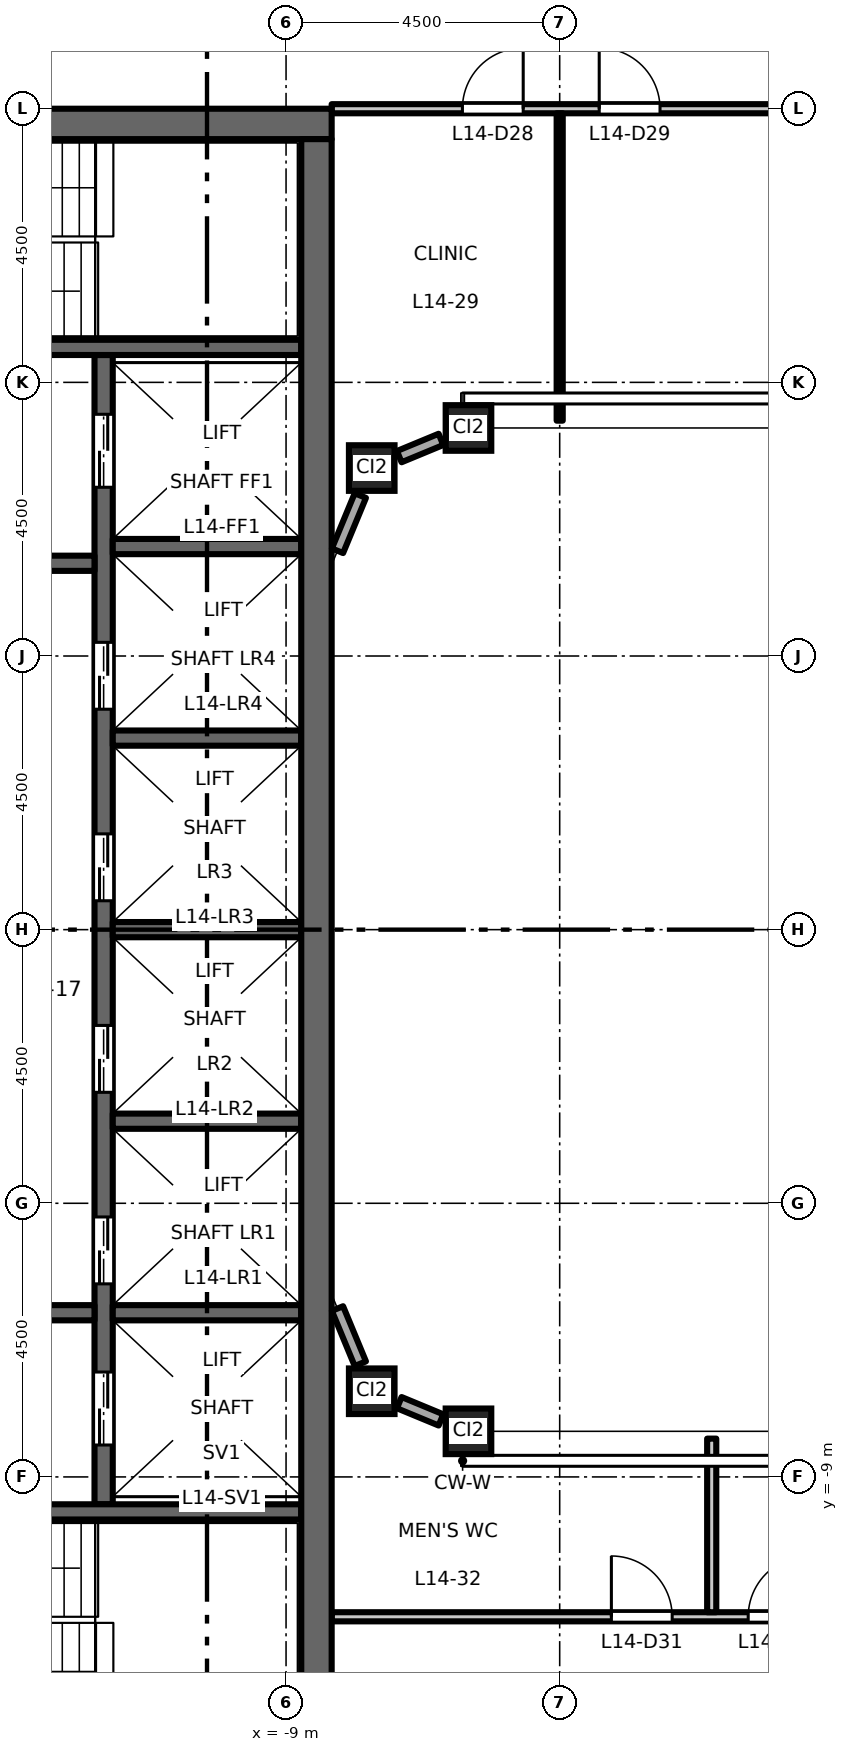
"""IFC4 building model, lengths in metres.
Left out: names, types, materials, properties, quantities, classifications, styles, units other than length and angle.
Written with IfcOpenShell. Run it as: python <this file> out.ifc"""

import sys

from ifc_helpers import new_model, si_unit, direction, frame, frame_2d, origin, origin_2d, place, context, subcontext, project, spatial, rectangle, hollow_rectangle, extrude, element, fill, save


model = new_model("IFC4")
c1 = context("Model", 3, precision=1e-05, world=origin(), true_north=direction((0.0, 1.0)))
c2 = subcontext(c1, "Body", "Model", "MODEL_VIEW")
j1 = project(units=[si_unit("LENGTHUNIT", "METRE"), si_unit("PLANEANGLEUNIT", "RADIAN")], contexts=[c1])
p1 = place(None, origin())
s1 = spatial("IfcSite", under=j1, at=p1, CompositionType="ELEMENT")
p2 = place(p1, origin())
s2 = spatial("IfcBuilding", under=s1, at=p2, CompositionType="ELEMENT")
p3 = place(p2, frame((0.0, 0.0, 67.2)))
s3 = spatial("IfcBuildingStorey", under=s2, at=p3, CompositionType="ELEMENT", Elevation=67.2)
for number, where, z_axis, x_axis in (
    (1, (-7.591, -7.591, 0.0), (0.0, 0.0, 1.0), (1.0, 0.0, 0.0)),
    (2, (-6.0, -8.25, 0.0), (0.0, 0.0, 1.0), (1.0, 0.0, 0.0)),
    (3, (-7.591, 7.591, 0.0), (0.0, 0.0, 1.0), (1.0, 0.0, 0.0)),
    (4, (-6.0, 8.25, 0.0), (0.0, 0.0, 1.0), (1.0, 0.0, 0.0)),
):
    element("IfcColumn", number, at=place(p3, frame(where, z_axis=z_axis, x_axis=x_axis)), inside=s3, PredefinedType="COLUMN", context=c2, shape_type="SweptSolid", body=[
        extrude(hollow_rectangle(XDim=0.75, YDim=0.75, WallThickness=0.045, at=origin_2d()), origin(), (0.0, 0.0, 1.0), 4.5),
    ])
p4 = place(p3, frame((-12.0, -9.45, 0.0), z_axis=(0.0, 0.0, 1.0), x_axis=(0.0, 1.0, 0.0)))
e5 = element("IfcWall", 5, at=p4, inside=s3, PredefinedType="SHEAR", context=c2, shape_type="SweptSolid", body=[
    extrude(rectangle(XDim=18.9, YDim=0.3, at=frame_2d((9.45, 0.0))), origin(), (0.0, 0.0, 1.0), 4.35),
])
p5 = place(p4, frame((3.625, 0.0, 0.0)))
e6 = element("IfcOpeningElement", 6, at=p5, cuts=e5, PredefinedType="OPENING", context=c2, shape_type="SweptSolid", body=[
    extrude(rectangle(XDim=1.1, YDim=2.1, at=frame_2d((0.55, 1.05))), frame((0.0, 0.16, 0.0), z_axis=(0.0, -1.0, 0.0), x_axis=(1.0, 0.0, 0.0)), (0.0, 0.0, 1.0), 0.32),
])
p6 = place(p4, frame((6.775, 0.0, 0.0)))
e7 = element("IfcOpeningElement", 7, at=p6, cuts=e5, PredefinedType="OPENING", context=c2, shape_type="SweptSolid", body=[
    extrude(rectangle(XDim=1.1, YDim=2.1, at=frame_2d((0.55, 1.05))), frame((0.0, 0.16, 0.0), z_axis=(0.0, -1.0, 0.0), x_axis=(1.0, 0.0, 0.0)), (0.0, 0.0, 1.0), 0.32),
])
p7 = place(p4, frame((9.925, 0.0, 0.0)))
e8 = element("IfcOpeningElement", 8, at=p7, cuts=e5, PredefinedType="OPENING", context=c2, shape_type="SweptSolid", body=[
    extrude(rectangle(XDim=1.1, YDim=2.1, at=frame_2d((0.55, 1.05))), frame((0.0, 0.16, 0.0), z_axis=(0.0, -1.0, 0.0), x_axis=(1.0, 0.0, 0.0)), (0.0, 0.0, 1.0), 0.32),
])
p8 = place(p4, frame((13.075, 0.0, 0.0)))
e9 = element("IfcOpeningElement", 9, at=p8, cuts=e5, PredefinedType="OPENING", context=c2, shape_type="SweptSolid", body=[
    extrude(rectangle(XDim=1.1, YDim=2.1, at=frame_2d((0.55, 1.05))), frame((0.0, 0.16, 0.0), z_axis=(0.0, -1.0, 0.0), x_axis=(1.0, 0.0, 0.0)), (0.0, 0.0, 1.0), 0.32),
])
p9 = place(p4, frame((16.725, 0.0, 0.0)))
e10 = element("IfcOpeningElement", 10, at=p9, cuts=e5, PredefinedType="OPENING", context=c2, shape_type="SweptSolid", body=[
    extrude(rectangle(XDim=1.2, YDim=2.1, at=frame_2d((0.6, 1.05))), frame((0.0, 0.16, 0.0), z_axis=(0.0, -1.0, 0.0), x_axis=(1.0, 0.0, 0.0)), (0.0, 0.0, 1.0), 0.32),
])
p10 = place(p4, frame((0.975, 0.0, 0.0)))
e11 = element("IfcOpeningElement", 11, at=p10, cuts=e5, PredefinedType="OPENING", context=c2, shape_type="SweptSolid", body=[
    extrude(rectangle(XDim=1.2, YDim=2.1, at=frame_2d((0.6, 1.05))), frame((0.0, 0.16, 0.0), z_axis=(0.0, -1.0, 0.0), x_axis=(1.0, 0.0, 0.0)), (0.0, 0.0, 1.0), 0.32),
])
p11 = place(p3, frame((-12.15, 6.025, 0.0), z_axis=(0.0, 0.0, 1.0), x_axis=(-1.0, 0.0, 0.0)))
e12 = element("IfcWall", 12, at=p11, inside=s3, PredefinedType="SHEAR", context=c2, shape_type="SweptSolid", body=[
    extrude(rectangle(XDim=4.6, YDim=0.25, at=frame_2d((2.3, 0.0))), origin(), (0.0, 0.0, 1.0), 4.35),
])
p12 = place(p11, frame((1.8, 0.0, 0.0)))
e13 = element("IfcOpeningElement", 13, at=p12, cuts=e12, PredefinedType="OPENING", context=c2, shape_type="SweptSolid", body=[
    extrude(rectangle(XDim=1.0, YDim=2.1, at=frame_2d((0.5, 1.05))), frame((0.0, 0.135, 0.0), z_axis=(0.0, -1.0, 0.0), x_axis=(1.0, 0.0, 0.0)), (0.0, 0.0, 1.0), 0.27),
])
p13 = place(p3, frame((-12.15, -6.3, 0.0), z_axis=(0.0, 0.0, 1.0), x_axis=(-1.0, 0.0, 0.0)))
e14 = element("IfcWall", 14, at=p13, inside=s3, PredefinedType="SHEAR", context=c2, shape_type="SweptSolid", body=[
    extrude(rectangle(XDim=9.1, YDim=0.25, at=frame_2d((4.55, 0.0))), origin(), (0.0, 0.0, 1.0), 4.35),
])
p14 = place(p13, frame((1.8, 0.0, 0.0)))
e15 = element("IfcOpeningElement", 15, at=p14, cuts=e14, PredefinedType="OPENING", context=c2, shape_type="SweptSolid", body=[
    extrude(rectangle(XDim=1.0, YDim=2.1, at=frame_2d((0.5, 1.05))), frame((0.0, 0.135, 0.0), z_axis=(0.0, -1.0, 0.0), x_axis=(1.0, 0.0, 0.0)), (0.0, 0.0, 1.0), 0.27),
])
p15 = place(p13, frame((6.65, 0.0, 0.0)))
e16 = element("IfcOpeningElement", 16, at=p15, cuts=e14, PredefinedType="OPENING", context=c2, shape_type="SweptSolid", body=[
    extrude(rectangle(XDim=0.9, YDim=2.1, at=frame_2d((0.45, 1.05))), frame((0.0, 0.135, 0.0), z_axis=(0.0, -1.0, 0.0), x_axis=(1.0, 0.0, 0.0)), (0.0, 0.0, 1.0), 0.27),
])
for number, where, z_axis, x_axis in (
    (17, (-8.75, 0.0, 0.0), (0.0, 0.0, 1.0), (-1.0, 0.0, 0.0)),
    (18, (-8.75, 3.15, 0.0), (0.0, 0.0, 1.0), (-1.0, 0.0, 0.0)),
    (19, (-8.75, 6.3, 0.0), (0.0, 0.0, 1.0), (-1.0, 0.0, 0.0)),
    (20, (-8.75, -3.15, 0.0), (0.0, 0.0, 1.0), (-1.0, 0.0, 0.0)),
    (21, (-8.75, -6.3, 0.0), (0.0, 0.0, 1.0), (-1.0, 0.0, 0.0)),
):
    element("IfcWall", number, at=place(p3, frame(where, z_axis=z_axis, x_axis=x_axis)), inside=s3, PredefinedType="SHEAR", context=c2, shape_type="SweptSolid", body=[
        extrude(rectangle(XDim=3.1, YDim=0.25, at=frame_2d((1.55, 0.0))), origin(), (0.0, 0.0, 1.0), 4.35),
    ])
p16 = place(p3, frame((-8.75, 9.575, 0.0), z_axis=(0.0, 0.0, 1.0), x_axis=(-1.0, 0.0, 0.0)))
e22 = element("IfcWall", 22, at=p16, inside=s3, PredefinedType="SHEAR", context=c2, shape_type="SweptSolid", body=[
    extrude(rectangle(XDim=8.0, YDim=0.25, at=frame_2d((4.0, 0.0))), origin(), (0.0, 0.0, 1.0), 4.35),
])
p17 = place(p16, frame((6.65, 0.0, 0.0)))
e23 = element("IfcOpeningElement", 23, at=p17, cuts=e22, PredefinedType="OPENING", context=c2, shape_type="SweptSolid", body=[
    extrude(rectangle(XDim=1.1, YDim=2.1, at=frame_2d((0.55, 1.05))), frame((0.0, 0.135, 0.0), z_axis=(0.0, -1.0, 0.0), x_axis=(1.0, 0.0, 0.0)), (0.0, 0.0, 1.0), 0.27),
])
p18 = place(p3, frame((-8.75, -9.575, 0.0), z_axis=(0.0, 0.0, 1.0), x_axis=(-1.0, 0.0, 0.0)))
e24 = element("IfcWall", 24, at=p18, inside=s3, PredefinedType="SHEAR", context=c2, shape_type="SweptSolid", body=[
    extrude(rectangle(XDim=8.0, YDim=0.25, at=frame_2d((4.0, 0.0))), origin(), (0.0, 0.0, 1.0), 4.35),
])
p19 = place(p18, frame((6.65, 0.0, 0.0)))
e25 = element("IfcOpeningElement", 25, at=p19, cuts=e24, PredefinedType="OPENING", context=c2, shape_type="SweptSolid", body=[
    extrude(rectangle(XDim=1.1, YDim=2.1, at=frame_2d((0.55, 1.05))), frame((0.0, 0.135, 0.0), z_axis=(0.0, -1.0, 0.0), x_axis=(1.0, 0.0, 0.0)), (0.0, 0.0, 1.0), 0.27),
])
p20 = place(p3, frame((-8.25, 13.25, 0.0), z_axis=(0.0, 0.0, 1.0), x_axis=(-1.0, 0.0, 0.0)))
e26 = element("IfcWall", 26, at=p20, inside=s3, PredefinedType="SHEAR", context=c2, shape_type="SweptSolid", body=[
    extrude(rectangle(XDim=13.5, YDim=0.5, at=frame_2d((6.75, 0.0))), origin(), (0.0, 0.0, 1.0), 4.35),
])
p21 = place(p3, frame((-8.5, -13.0, 0.0), z_axis=(0.0, 0.0, 1.0), x_axis=(0.0, 1.0, 0.0)))
e27 = element("IfcWall", 27, at=p21, inside=s3, PredefinedType="SHEAR", context=c2, shape_type="SweptSolid", body=[
    extrude(rectangle(XDim=26.0, YDim=0.5, at=frame_2d((13.0, 0.0))), origin(), (0.0, 0.0, 1.0), 4.35),
])
p22 = place(p3, frame((-6.453, 8.062, 0.0), z_axis=(0.0, 0.0, 1.0), x_axis=(-0.923940677943, -0.382535780864, 0.0)))
e28 = element("IfcWall", 28, at=p22, inside=s3, PredefinedType="STANDARD", context=c2, shape_type="SweptSolid", body=[
    extrude(rectangle(XDim=0.742, YDim=0.2, at=frame_2d((0.371, 0.0))), origin(), (0.0, 0.0, 1.0), 3.73),
])
for number, where, z_axis, x_axis in (
    (29, (-7.779, 7.138, 0.0), (0.0, 0.0, 1.0), (-0.383, -0.924, 0.0)),
    (30, (-8.154, -6.231, 0.0), (0.0, 0.0, 1.0), (0.383, -0.924, 0.0)),
):
    element("IfcWall", number, at=place(p3, frame(where, z_axis=z_axis, x_axis=x_axis)), inside=s3, PredefinedType="STANDARD", context=c2, shape_type="SweptSolid", body=[
        extrude(rectangle(XDim=0.982, YDim=0.2, at=frame_2d((0.491, 0.0))), origin(), (0.0, 0.0, 1.0), 3.73),
    ])
p23 = place(p3, frame((-7.138, -7.779, 0.0), z_axis=(0.0, 0.0, 1.0), x_axis=(0.923940677943, -0.382535780864, 0.0)))
e31 = element("IfcWall", 31, at=p23, inside=s3, PredefinedType="STANDARD", context=c2, shape_type="SweptSolid", body=[
    extrude(rectangle(XDim=0.742, YDim=0.2, at=frame_2d((0.371, 0.0))), origin(), (0.0, 0.0, 1.0), 3.73),
])
p24 = place(p3, frame((-8.25, -11.3, 0.0), z_axis=(0.0, 0.0, 1.0), x_axis=(1.0, 0.0, 0.0)))
e32 = element("IfcWall", 32, at=p24, inside=s3, PredefinedType="PARTITIONING", context=c2, shape_type="SweptSolid", body=[
    extrude(rectangle(XDim=15.05, YDim=0.15, at=frame_2d((7.525, 0.0))), origin(), (0.0, 0.0, 1.0), 4.35),
])
p25 = place(p24, frame((4.6, 0.0, 0.0)))
e33 = element("IfcOpeningElement", 33, at=p25, cuts=e32, PredefinedType="OPENING", context=c2, shape_type="SweptSolid", body=[
    extrude(rectangle(XDim=1.0, YDim=2.1, at=frame_2d((0.5, 1.05))), frame((0.0, 0.085, 0.0), z_axis=(0.0, -1.0, 0.0), x_axis=(1.0, 0.0, 0.0)), (0.0, 0.0, 1.0), 0.17),
])
p26 = place(p24, frame((6.85, 0.0, 0.0)))
e34 = element("IfcOpeningElement", 34, at=p26, cuts=e32, PredefinedType="OPENING", context=c2, shape_type="SweptSolid", body=[
    extrude(rectangle(XDim=1.0, YDim=2.1, at=frame_2d((0.5, 1.05))), frame((0.0, 0.085, 0.0), z_axis=(0.0, -1.0, 0.0), x_axis=(1.0, 0.0, 0.0)), (0.0, 0.0, 1.0), 0.17),
])
p27 = place(p24, frame((13.4, 0.0, 0.0)))
e35 = element("IfcOpeningElement", 35, at=p27, cuts=e32, PredefinedType="OPENING", context=c2, shape_type="SweptSolid", body=[
    extrude(rectangle(XDim=1.0, YDim=2.1, at=frame_2d((0.5, 1.05))), frame((0.0, 0.085, 0.0), z_axis=(0.0, -1.0, 0.0), x_axis=(1.0, 0.0, 0.0)), (0.0, 0.0, 1.0), 0.17),
])
p28 = place(p3, frame((-8.25, 13.5, 0.0), z_axis=(0.0, 0.0, 1.0), x_axis=(1.0, 0.0, 0.0)))
e36 = element("IfcWall", 36, at=p28, inside=s3, PredefinedType="PARTITIONING", context=c2, shape_type="SweptSolid", body=[
    extrude(rectangle(XDim=16.5, YDim=0.15, at=frame_2d((8.25, 0.0))), origin(), (0.0, 0.0, 1.0), 3.85),
])
p29 = place(p28, frame((2.15, 0.0, 0.0)))
e37 = element("IfcOpeningElement", 37, at=p29, cuts=e36, PredefinedType="OPENING", context=c2, shape_type="SweptSolid", body=[
    extrude(rectangle(XDim=1.0, YDim=2.1, at=frame_2d((0.5, 1.05))), frame((0.0, 0.085, 0.0), z_axis=(0.0, -1.0, 0.0), x_axis=(1.0, 0.0, 0.0)), (0.0, 0.0, 1.0), 0.17),
])
p30 = place(p28, frame((4.4, 0.0, 0.0)))
e38 = element("IfcOpeningElement", 38, at=p30, cuts=e36, PredefinedType="OPENING", context=c2, shape_type="SweptSolid", body=[
    extrude(rectangle(XDim=1.0, YDim=2.1, at=frame_2d((0.5, 1.05))), frame((0.0, 0.085, 0.0), z_axis=(0.0, -1.0, 0.0), x_axis=(1.0, 0.0, 0.0)), (0.0, 0.0, 1.0), 0.17),
])
p31 = place(p3, frame((-4.5, 8.37, 0.0), z_axis=(0.0, 0.0, 1.0), x_axis=(0.0, 1.0, 0.0)))
e39 = element("IfcWall", 39, at=p31, inside=s3, PredefinedType="PARTITIONING", context=c2, shape_type="SweptSolid", body=[
    extrude(rectangle(XDim=5.055, YDim=0.1, at=frame_2d((2.527, 0.0))), origin(), (0.0, 0.0, 1.0), 3.35),
])
p32 = place(p3, frame((-2.0, -11.225, 0.0), z_axis=(0.0, 0.0, 1.0), x_axis=(0.0, 1.0, 0.0)))
e40 = element("IfcWall", 40, at=p32, inside=s3, PredefinedType="PARTITIONING", context=c2, shape_type="SweptSolid", body=[
    extrude(rectangle(XDim=2.855, YDim=0.15, at=frame_2d((1.427, 0.0))), origin(), (0.0, 0.0, 1.0), 4.35),
])
p33 = place(p5, origin())
e41 = element("IfcDoor", 41, at=p33, inside=s3, OperationType="DOUBLE_DOOR_SLIDING", PredefinedType="DOOR", context=c2, shape_type="SweptSolid", body=[
    extrude(rectangle(XDim=1.1, YDim=2.1, at=frame_2d((0.55, 1.05))), frame((0.0, 0.025, 0.0), z_axis=(0.0, -1.0, 0.0), x_axis=(1.0, 0.0, 0.0)), (0.0, 0.0, 1.0), 0.05),
])
fill(e6, e41)
p34 = place(p6, origin())
e42 = element("IfcDoor", 42, at=p34, inside=s3, OperationType="DOUBLE_DOOR_SLIDING", PredefinedType="DOOR", context=c2, shape_type="SweptSolid", body=[
    extrude(rectangle(XDim=1.1, YDim=2.1, at=frame_2d((0.55, 1.05))), frame((0.0, 0.025, 0.0), z_axis=(0.0, -1.0, 0.0), x_axis=(1.0, 0.0, 0.0)), (0.0, 0.0, 1.0), 0.05),
])
fill(e7, e42)
p35 = place(p7, origin())
e43 = element("IfcDoor", 43, at=p35, inside=s3, OperationType="DOUBLE_DOOR_SLIDING", PredefinedType="DOOR", context=c2, shape_type="SweptSolid", body=[
    extrude(rectangle(XDim=1.1, YDim=2.1, at=frame_2d((0.55, 1.05))), frame((0.0, 0.025, 0.0), z_axis=(0.0, -1.0, 0.0), x_axis=(1.0, 0.0, 0.0)), (0.0, 0.0, 1.0), 0.05),
])
fill(e8, e43)
p36 = place(p8, origin())
e44 = element("IfcDoor", 44, at=p36, inside=s3, OperationType="DOUBLE_DOOR_SLIDING", PredefinedType="DOOR", context=c2, shape_type="SweptSolid", body=[
    extrude(rectangle(XDim=1.1, YDim=2.1, at=frame_2d((0.55, 1.05))), frame((0.0, 0.025, 0.0), z_axis=(0.0, -1.0, 0.0), x_axis=(1.0, 0.0, 0.0)), (0.0, 0.0, 1.0), 0.05),
])
fill(e9, e44)
p37 = place(p9, origin())
e45 = element("IfcDoor", 45, at=p37, inside=s3, OperationType="DOUBLE_DOOR_SLIDING", PredefinedType="DOOR", context=c2, shape_type="SweptSolid", body=[
    extrude(rectangle(XDim=1.2, YDim=2.1, at=frame_2d((0.6, 1.05))), frame((0.0, 0.025, 0.0), z_axis=(0.0, -1.0, 0.0), x_axis=(1.0, 0.0, 0.0)), (0.0, 0.0, 1.0), 0.05),
])
fill(e10, e45)
p38 = place(p10, origin())
e46 = element("IfcDoor", 46, at=p38, inside=s3, OperationType="DOUBLE_DOOR_SLIDING", PredefinedType="DOOR", context=c2, shape_type="SweptSolid", body=[
    extrude(rectangle(XDim=1.2, YDim=2.1, at=frame_2d((0.6, 1.05))), frame((0.0, 0.025, 0.0), z_axis=(0.0, -1.0, 0.0), x_axis=(1.0, 0.0, 0.0)), (0.0, 0.0, 1.0), 0.05),
])
fill(e11, e46)
p39 = place(p29, origin())
e47 = element("IfcDoor", 47, at=p39, inside=s3, OperationType="SINGLE_SWING_RIGHT", PredefinedType="DOOR", context=c2, shape_type="SweptSolid", body=[
    extrude(rectangle(XDim=1.0, YDim=2.1, at=frame_2d((0.5, 1.05))), frame((0.0, 0.025, 0.0), z_axis=(0.0, -1.0, 0.0), x_axis=(1.0, 0.0, 0.0)), (0.0, 0.0, 1.0), 0.05),
])
fill(e37, e47)
p40 = place(p30, origin())
e48 = element("IfcDoor", 48, at=p40, inside=s3, OperationType="SINGLE_SWING_LEFT", PredefinedType="DOOR", context=c2, shape_type="SweptSolid", body=[
    extrude(rectangle(XDim=1.0, YDim=2.1, at=frame_2d((0.5, 1.05))), frame((0.0, 0.025, 0.0), z_axis=(0.0, -1.0, 0.0), x_axis=(1.0, 0.0, 0.0)), (0.0, 0.0, 1.0), 0.05),
])
fill(e38, e48)
p41 = place(p25, origin())
e49 = element("IfcDoor", 49, at=p41, inside=s3, OperationType="SINGLE_SWING_LEFT", PredefinedType="DOOR", context=c2, shape_type="SweptSolid", body=[
    extrude(rectangle(XDim=1.0, YDim=2.1, at=frame_2d((0.5, 1.05))), frame((0.0, 0.025, 0.0), z_axis=(0.0, -1.0, 0.0), x_axis=(1.0, 0.0, 0.0)), (0.0, 0.0, 1.0), 0.05),
])
fill(e33, e49)
p42 = place(p26, origin())
e50 = element("IfcDoor", 50, at=p42, inside=s3, OperationType="SINGLE_SWING_RIGHT", PredefinedType="DOOR", context=c2, shape_type="SweptSolid", body=[
    extrude(rectangle(XDim=1.0, YDim=2.1, at=frame_2d((0.5, 1.05))), frame((0.0, 0.025, 0.0), z_axis=(0.0, -1.0, 0.0), x_axis=(1.0, 0.0, 0.0)), (0.0, 0.0, 1.0), 0.05),
])
fill(e34, e50)
save(model, sys.argv[1])
